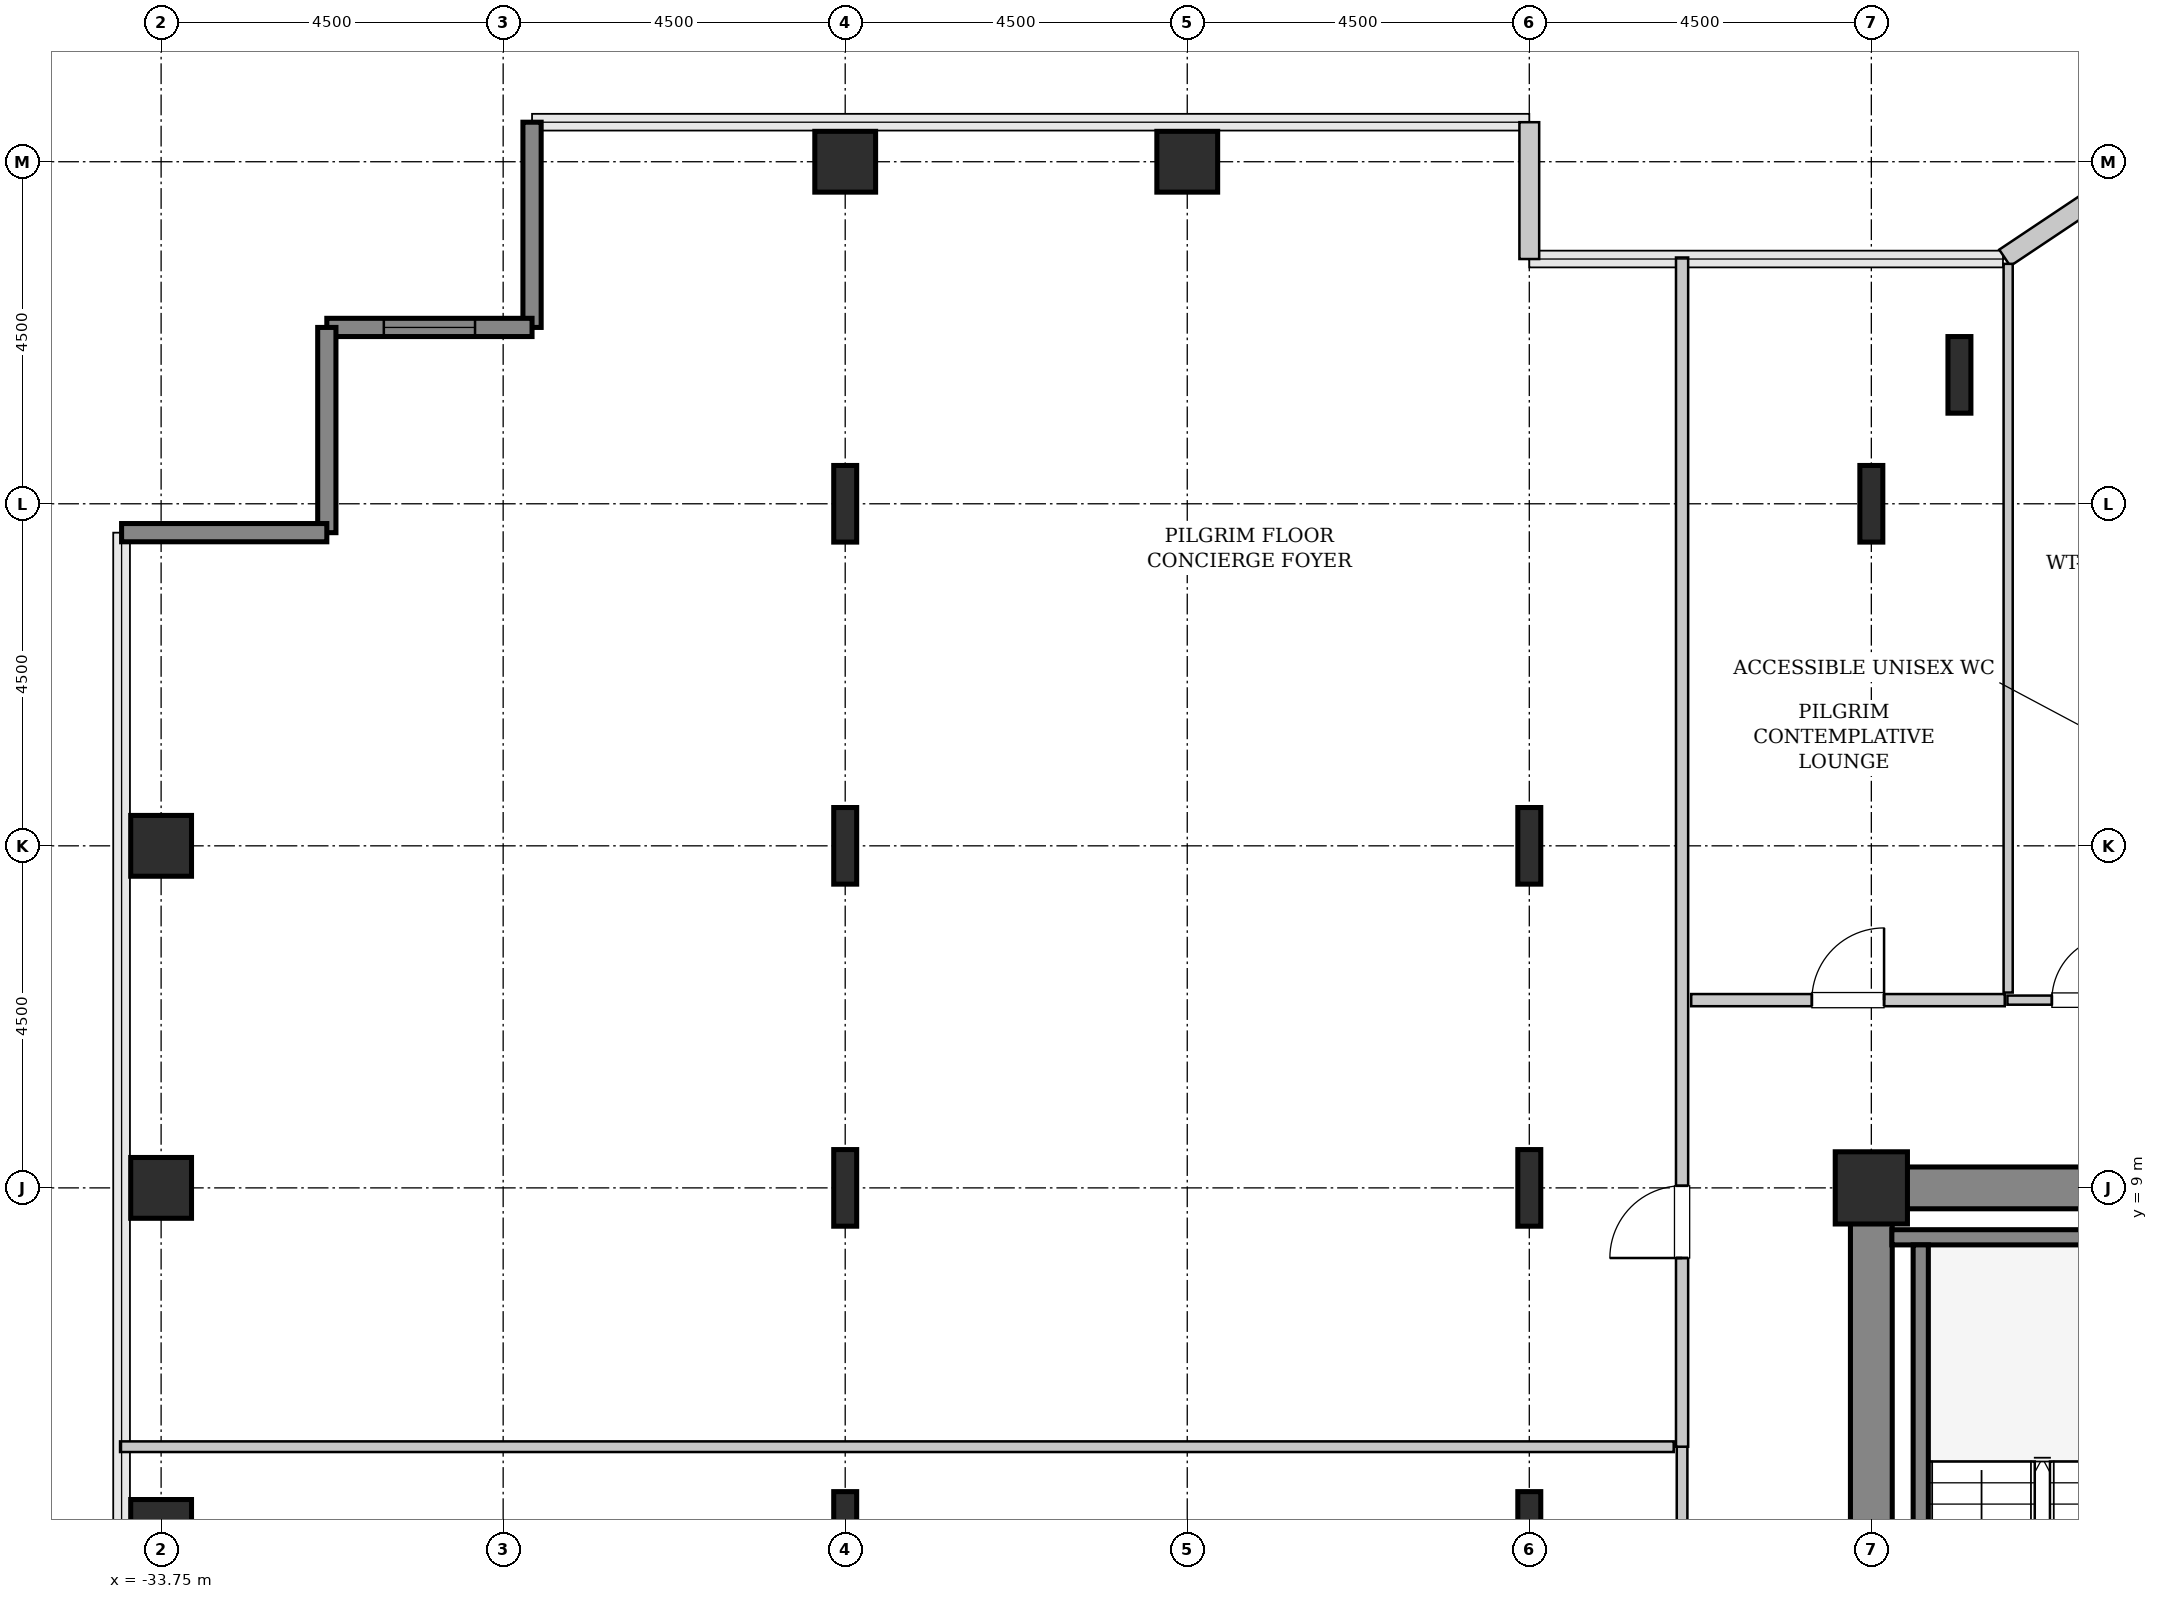
"""IFC4 building model, lengths in metres.
Left out: names, types, materials, properties, quantities, classifications, styles, units other than length and angle.
Written with IfcOpenShell. Run it as: python <this file> out.ifc"""

import sys

from ifc_helpers import new_model, si_unit, direction, frame, frame_2d, origin, origin_2d, place, context, subcontext, project, spatial, rectangle, hollow_rectangle, i_section, extrude, source, transform, mapped, element, fill, save


model = new_model("IFC4")
c1 = context("Model", 3, precision=1e-05, world=origin(), true_north=direction((0.0, 1.0)))
c2 = subcontext(c1, "Body", "Model", "MODEL_VIEW")
j1 = project(units=[si_unit("LENGTHUNIT", "METRE"), si_unit("PLANEANGLEUNIT", "RADIAN")], contexts=[c1])
p1 = place(None, origin())
s1 = spatial("IfcSite", under=j1, at=p1, CompositionType="ELEMENT")
p2 = place(p1, origin())
s2 = spatial("IfcBuilding", under=s1, at=p2, CompositionType="ELEMENT")
p3 = place(p2, frame((0.0, 0.0, 128.8)))
s3 = spatial("IfcBuildingStorey", under=s2, at=p3, CompositionType="ELEMENT", Elevation=128.8)
m1 = source(origin(), c2, "Body", "SweptSolid", [
    extrude(rectangle(XDim=9.975, YDim=0.55, at=frame_2d((4.987, 0.0))), origin(), (0.0, 0.0, 1.0), 3.8),
])
p4 = place(p3, frame((-11.525, 9.0, 0.0), z_axis=(0.0, 0.0, 1.0), x_axis=(1.0, 0.0, 0.0)))
e1 = element("IfcWall", 1, at=p4, inside=s3, PredefinedType="SHEAR", context=c2, shape_type="MappedRepresentation", body=[
    mapped(m1, transform((0.0, 0.0, 0.0), x_axis=(1.0, 0.0, 0.0), y_axis=(0.0, 1.0, 0.0), z_axis=(0.0, 0.0, 1.0), scale=1.0)),
])
m2 = source(origin(), c2, "Body", "SweptSolid", [
    extrude(rectangle(XDim=7.375, YDim=0.55, at=frame_2d((3.688, 0.0))), origin(), (0.0, 0.0, 1.0), 3.8),
])
p5 = place(p3, frame((-11.25, 1.35, 0.0), z_axis=(0.0, 0.0, 1.0), x_axis=(0.0, 1.0, 0.0)))
e2 = element("IfcWall", 2, at=p5, inside=s3, PredefinedType="SHEAR", context=c2, shape_type="MappedRepresentation", body=[
    mapped(m2, transform((0.0, 0.0, 0.0), x_axis=(1.0, 0.0, 0.0), y_axis=(0.0, 1.0, 0.0), z_axis=(0.0, 0.0, 1.0), scale=1.0)),
])
m3 = source(origin(), c2, "Body", "SweptSolid", [
    extrude(hollow_rectangle(XDim=0.8, YDim=0.8, WallThickness=0.04, InnerFilletRadius=0.04, OuterFilletRadius=0.08, at=origin_2d()), origin(), (0.0, 0.0, 1.0), 3.8),
])
for number, where, z_axis, x_axis in (
    (3, (-33.75, 4.5, 0.0), (0.0, 0.0, 1.0), (1.0, 0.0, 0.0)),
    (4, (-33.75, 9.0, 0.0), (0.0, 0.0, 1.0), (1.0, 0.0, 0.0)),
    (5, (-33.75, 13.5, 0.0), (0.0, 0.0, 1.0), (1.0, 0.0, 0.0)),
):
    element("IfcColumn", number, at=place(p3, frame(where, z_axis=z_axis, x_axis=x_axis)), inside=s3, PredefinedType="COLUMN", context=c2, shape_type="MappedRepresentation", body=[
        mapped(m3, transform((0.0, 0.0, 0.0), x_axis=(1.0, 0.0, 0.0), y_axis=(0.0, 1.0, 0.0), z_axis=(0.0, 0.0, 1.0), scale=1.0)),
    ])
m4 = source(origin(), c2, "Body", "SweptSolid", [
    extrude(i_section(OverallWidth=0.302, OverallDepth=1.008, WebThickness=0.021, FlangeThickness=0.04, FilletRadius=0.03, at=origin_2d()), origin(), (0.0, 0.0, 1.0), 3.8),
])
for number, where, z_axis, x_axis in (
    (6, (-24.75, 4.5, 0.0), (0.0, 0.0, 1.0), (1.0, 0.0, 0.0)),
    (7, (-24.75, 9.0, 0.0), (0.0, 0.0, 1.0), (1.0, 0.0, 0.0)),
    (8, (-24.75, 13.5, 0.0), (0.0, 0.0, 1.0), (1.0, 0.0, 0.0)),
    (9, (-24.75, 18.0, 0.0), (0.0, 0.0, 1.0), (1.0, 0.0, 0.0)),
):
    element("IfcColumn", number, at=place(p3, frame(where, z_axis=z_axis, x_axis=x_axis)), inside=s3, PredefinedType="COLUMN", context=c2, shape_type="MappedRepresentation", body=[
        mapped(m4, transform((0.0, 0.0, 0.0), x_axis=(1.0, 0.0, 0.0), y_axis=(0.0, 1.0, 0.0), z_axis=(0.0, 0.0, 1.0), scale=1.0)),
    ])
for number, where, z_axis, x_axis in (
    (10, (-24.75, 22.5, 0.0), (0.0, 0.0, 1.0), (1.0, 0.0, 0.0)),
    (11, (-20.25, 22.5, 0.0), (0.0, 0.0, 1.0), (1.0, 0.0, 0.0)),
):
    element("IfcColumn", number, at=place(p3, frame(where, z_axis=z_axis, x_axis=x_axis)), inside=s3, PredefinedType="COLUMN", context=c2, shape_type="MappedRepresentation", body=[
        mapped(m3, transform((0.0, 0.0, 0.0), x_axis=(1.0, 0.0, 0.0), y_axis=(0.0, 1.0, 0.0), z_axis=(0.0, 0.0, 1.0), scale=1.0)),
    ])
for number, where, z_axis, x_axis in (
    (12, (-15.75, 4.5, 0.0), (0.0, 0.0, 1.0), (1.0, 0.0, 0.0)),
    (13, (-15.75, 9.0, 0.0), (0.0, 0.0, 1.0), (1.0, 0.0, 0.0)),
    (14, (-15.75, 13.5, 0.0), (0.0, 0.0, 1.0), (1.0, 0.0, 0.0)),
):
    element("IfcColumn", number, at=place(p3, frame(where, z_axis=z_axis, x_axis=x_axis)), inside=s3, PredefinedType="COLUMN", context=c2, shape_type="MappedRepresentation", body=[
        mapped(m4, transform((0.0, 0.0, 0.0), x_axis=(1.0, 0.0, 0.0), y_axis=(0.0, 1.0, 0.0), z_axis=(0.0, 0.0, 1.0), scale=1.0)),
    ])
m5 = source(origin(), c2, "Body", "SweptSolid", [
    extrude(hollow_rectangle(XDim=0.95, YDim=0.95, WallThickness=0.045, InnerFilletRadius=0.045, OuterFilletRadius=0.09, at=origin_2d()), origin(), (0.0, 0.0, 1.0), 3.8),
])
p6 = place(p3, frame((-11.25, 9.0, 0.0), z_axis=(0.0, 0.0, 1.0), x_axis=(1.0, 0.0, 0.0)))
e15 = element("IfcColumn", 15, at=p6, inside=s3, PredefinedType="COLUMN", context=c2, shape_type="MappedRepresentation", body=[
    mapped(m5, transform((0.0, 0.0, 0.0), x_axis=(1.0, 0.0, 0.0), y_axis=(0.0, 1.0, 0.0), z_axis=(0.0, 0.0, 1.0), scale=1.0)),
])
for number, where, z_axis, x_axis in (
    (16, (-11.25, 18.0, 0.0), (0.0, 0.0, 1.0), (1.0, 0.0, 0.0)),
    (17, (-10.091, 19.696, 0.0), (0.0, 0.0, 1.0), (1.0, 0.0, 0.0)),
):
    element("IfcColumn", number, at=place(p3, frame(where, z_axis=z_axis, x_axis=x_axis)), inside=s3, PredefinedType="COLUMN", context=c2, shape_type="MappedRepresentation", body=[
        mapped(m4, transform((0.0, 0.0, 0.0), x_axis=(1.0, 0.0, 0.0), y_axis=(0.0, 1.0, 0.0), z_axis=(0.0, 0.0, 1.0), scale=1.0)),
    ])
m6 = source(origin(), c2, "Body", "SweptSolid", [
    extrude(rectangle(XDim=1.469, YDim=0.26, at=frame_2d((0.734, 0.0))), origin(), (0.0, 0.0, 1.0), 3.55),
])
p7 = place(p3, frame((-8.273, 22.052, 0.0), z_axis=(0.0, 0.0, 1.0), x_axis=(-0.831461760506, -0.555581983884, 0.0)))
e18 = element("IfcWall", 18, at=p7, inside=s3, PredefinedType="SOLIDWALL", context=c2, shape_type="MappedRepresentation", body=[
    mapped(m6, transform((0.0, 0.0, 0.0), x_axis=(1.0, 0.0, 0.0), y_axis=(0.0, 1.0, 0.0), z_axis=(0.0, 0.0, 1.0), scale=1.0)),
])
m7 = source(origin(), c2, "Body", "SweptSolid", [
    extrude(rectangle(XDim=1.8, YDim=0.26, at=frame_2d((0.9, 0.0))), origin(), (0.0, 0.0, 1.0), 3.55),
])
p8 = place(p3, frame((-15.75, 21.22, 0.0), z_axis=(0.0, 0.0, 1.0), x_axis=(0.0, 1.0, 0.0)))
e19 = element("IfcWall", 19, at=p8, inside=s3, PredefinedType="SOLIDWALL", context=c2, shape_type="MappedRepresentation", body=[
    mapped(m7, transform((0.0, 0.0, 0.0), x_axis=(1.0, 0.0, 0.0), y_axis=(0.0, 1.0, 0.0), z_axis=(0.0, 0.0, 1.0), scale=1.0)),
])
m8 = source(origin(), c2, "Body", "SweptSolid", [
    extrude(rectangle(XDim=2.7, YDim=0.24, at=frame_2d((1.35, 0.0))), origin(), (0.0, 0.0, 1.0), 3.55),
])
p9 = place(p3, frame((-28.87, 23.02, 0.0), z_axis=(0.0, 0.0, 1.0), x_axis=(0.0, -1.0, 0.0)))
e20 = element("IfcWall", 20, at=p9, inside=s3, PredefinedType="SHEAR", context=c2, shape_type="MappedRepresentation", body=[
    mapped(m8, transform((0.0, 0.0, 0.0), x_axis=(1.0, 0.0, 0.0), y_axis=(0.0, 1.0, 0.0), z_axis=(0.0, 0.0, 1.0), scale=1.0)),
])
p10 = place(p3, frame((-28.87, 20.32, 0.0), z_axis=(0.0, 0.0, 1.0), x_axis=(-1.0, 0.0, 0.0)))
e21 = element("IfcWall", 21, at=p10, inside=s3, PredefinedType="SHEAR", context=c2, shape_type="MappedRepresentation", body=[
    mapped(m8, transform((0.0, 0.0, 0.0), x_axis=(1.0, 0.0, 0.0), y_axis=(0.0, 1.0, 0.0), z_axis=(0.0, 0.0, 1.0), scale=1.0)),
])
p11 = place(p10, frame((0.75, 0.0, 0.85)))
e22 = element("IfcOpeningElement", 22, at=p11, cuts=e21, PredefinedType="OPENING", context=c2, shape_type="SweptSolid", body=[
    extrude(rectangle(XDim=1.2, YDim=1.8, at=frame_2d((0.6, 0.9))), frame((0.0, 0.13, 0.0), z_axis=(0.0, -1.0, 0.0), x_axis=(1.0, 0.0, 0.0)), (0.0, 0.0, 1.0), 0.26),
])
for number, where, z_axis, x_axis in (
    (23, (-31.57, 20.32, 0.0), (0.0, 0.0, 1.0), (0.0, -1.0, 0.0)),
    (24, (-31.57, 17.62, 0.0), (0.0, 0.0, 1.0), (-1.0, 0.0, 0.0)),
):
    element("IfcWall", number, at=place(p3, frame(where, z_axis=z_axis, x_axis=x_axis)), inside=s3, PredefinedType="SHEAR", context=c2, shape_type="MappedRepresentation", body=[
        mapped(m8, transform((0.0, 0.0, 0.0), x_axis=(1.0, 0.0, 0.0), y_axis=(0.0, 1.0, 0.0), z_axis=(0.0, 0.0, 1.0), scale=1.0)),
    ])
m9 = source(origin(), c2, "Body", "SweptSolid", [
    extrude(rectangle(XDim=3.68, YDim=0.2, at=frame_2d((1.84, 0.0))), origin(), (0.0, 0.0, 1.0), 3.8),
])
p12 = place(p3, frame((-7.3, 8.35, 0.0), z_axis=(0.0, 0.0, 1.0), x_axis=(-1.0, 0.0, 0.0)))
e25 = element("IfcWall", 25, at=p12, inside=s3, PredefinedType="SOLIDWALL", context=c2, shape_type="MappedRepresentation", body=[
    mapped(m9, transform((0.0, 0.0, 0.0), x_axis=(1.0, 0.0, 0.0), y_axis=(0.0, 1.0, 0.0), z_axis=(0.0, 0.0, 1.0), scale=1.0)),
])
m10 = source(origin(), c2, "Body", "SweptSolid", [
    extrude(rectangle(XDim=7.1, YDim=0.2, at=frame_2d((3.55, 0.0))), origin(), (0.0, 0.0, 1.0), 3.8),
])
p13 = place(p3, frame((-10.6, 1.15, 0.0), z_axis=(0.0, 0.0, 1.0), x_axis=(0.0, 1.0, 0.0)))
e26 = element("IfcWall", 26, at=p13, inside=s3, PredefinedType="SOLIDWALL", context=c2, shape_type="MappedRepresentation", body=[
    mapped(m10, transform((0.0, 0.0, 0.0), x_axis=(1.0, 0.0, 0.0), y_axis=(0.0, 1.0, 0.0), z_axis=(0.0, 0.0, 1.0), scale=1.0)),
])
m11 = source(origin(), c2, "Body", "SweptSolid", [
    extrude(rectangle(XDim=2.02, YDim=0.12, at=frame_2d((1.01, 0.0))), origin(), (0.0, 0.0, 1.0), 3.535),
])
p14 = place(p3, frame((-9.46, 11.47, 0.0), z_axis=(0.0, 0.0, 1.0), x_axis=(1.0, 0.0, 0.0)))
e27 = element("IfcWall", 27, at=p14, inside=s3, PredefinedType="PLUMBINGWALL", context=c2, shape_type="MappedRepresentation", body=[
    mapped(m11, transform((0.0, 0.0, 0.0), x_axis=(1.0, 0.0, 0.0), y_axis=(0.0, 1.0, 0.0), z_axis=(0.0, 0.0, 1.0), scale=1.0)),
])
p15 = place(p14, frame((0.585, 0.0, 0.0)))
e28 = element("IfcOpeningElement", 28, at=p15, cuts=e27, PredefinedType="OPENING", context=c2, shape_type="SweptSolid", body=[
    extrude(rectangle(XDim=0.85, YDim=2.1, at=frame_2d((0.425, 1.05))), frame((0.0, 0.07, 0.0), z_axis=(0.0, -1.0, 0.0), x_axis=(1.0, 0.0, 0.0)), (0.0, 0.0, 1.0), 0.14),
])
m12 = source(origin(), c2, "Body", "SweptSolid", [
    extrude(rectangle(XDim=9.587, YDim=0.12, at=frame_2d((4.793, 0.0))), origin(), (0.0, 0.0, 1.0), 3.535),
])
p16 = place(p3, frame((-9.45, 11.57, 0.0), z_axis=(0.0, 0.0, 1.0), x_axis=(0.0, 1.0, 0.0)))
e29 = element("IfcWall", 29, at=p16, inside=s3, PredefinedType="PLUMBINGWALL", context=c2, shape_type="MappedRepresentation", body=[
    mapped(m12, transform((0.0, 0.0, 0.0), x_axis=(1.0, 0.0, 0.0), y_axis=(0.0, 1.0, 0.0), z_axis=(0.0, 0.0, 1.0), scale=1.0)),
])
m13 = source(origin(), c2, "Body", "SweptSolid", [
    extrude(rectangle(XDim=2.375, YDim=0.14, at=frame_2d((1.188, 0.0))), origin(), (0.0, 0.0, 1.0), 3.535),
])
p17 = place(p3, frame((-13.74, 3.23, 0.0), z_axis=(0.0, 0.0, 1.0), x_axis=(0.0, 1.0, 0.0)))
e30 = element("IfcWall", 30, at=p17, inside=s3, PredefinedType="PARTITIONING", context=c2, shape_type="MappedRepresentation", body=[
    mapped(m13, transform((0.0, 0.0, 0.0), x_axis=(1.0, 0.0, 0.0), y_axis=(0.0, 1.0, 0.0), z_axis=(0.0, 0.0, 1.0), scale=1.0)),
])
m14 = source(origin(), c2, "Body", "SweptSolid", [
    extrude(rectangle(XDim=20.44, YDim=0.14, at=frame_2d((10.22, 0.0))), origin(), (0.0, 0.0, 1.0), 3.535),
])
p18 = place(p3, frame((-34.29, 5.595, 0.0), z_axis=(0.0, 0.0, 1.0), x_axis=(1.0, 0.0, 0.0)))
e31 = element("IfcWall", 31, at=p18, inside=s3, PredefinedType="PARTITIONING", context=c2, shape_type="MappedRepresentation", body=[
    mapped(m14, transform((0.0, 0.0, 0.0), x_axis=(1.0, 0.0, 0.0), y_axis=(0.0, 1.0, 0.0), z_axis=(0.0, 0.0, 1.0), scale=1.0)),
])
m15 = source(origin(), c2, "Body", "SweptSolid", [
    extrude(rectangle(XDim=15.645, YDim=0.16, at=frame_2d((7.823, 0.0))), origin(), (0.0, 0.0, 1.0), 3.535),
])
p19 = place(p3, frame((-13.74, 5.595, 0.0), z_axis=(0.0, 0.0, 1.0), x_axis=(0.0, 1.0, 0.0)))
e32 = element("IfcWall", 32, at=p19, inside=s3, PredefinedType="PARTITIONING", context=c2, shape_type="MappedRepresentation", body=[
    mapped(m15, transform((0.0, 0.0, 0.0), x_axis=(1.0, 0.0, 0.0), y_axis=(0.0, 1.0, 0.0), z_axis=(0.0, 0.0, 1.0), scale=1.0)),
])
p20 = place(p19, frame((2.482, 0.0, 0.0)))
e33 = element("IfcOpeningElement", 33, at=p20, cuts=e32, PredefinedType="OPENING", context=c2, shape_type="SweptSolid", body=[
    extrude(rectangle(XDim=0.95, YDim=2.1, at=frame_2d((0.475, 1.05))), frame((0.0, 0.09, 0.0), z_axis=(0.0, -1.0, 0.0), x_axis=(1.0, 0.0, 0.0)), (0.0, 0.0, 1.0), 0.18),
])
m16 = source(origin(), c2, "Body", "SweptSolid", [
    extrude(rectangle(XDim=4.125, YDim=0.16, at=frame_2d((2.062, 0.0))), origin(), (0.0, 0.0, 1.0), 3.535),
])
p21 = place(p3, frame((-13.62, 11.47, 0.0), z_axis=(0.0, 0.0, 1.0), x_axis=(1.0, 0.0, 0.0)))
e34 = element("IfcWall", 34, at=p21, inside=s3, PredefinedType="PARTITIONING", context=c2, shape_type="MappedRepresentation", body=[
    mapped(m16, transform((0.0, 0.0, 0.0), x_axis=(1.0, 0.0, 0.0), y_axis=(0.0, 1.0, 0.0), z_axis=(0.0, 0.0, 1.0), scale=1.0)),
])
p22 = place(p21, frame((1.587, 0.0, 0.0)))
e35 = element("IfcOpeningElement", 35, at=p22, cuts=e34, PredefinedType="OPENING", context=c2, shape_type="SweptSolid", body=[
    extrude(rectangle(XDim=0.95, YDim=2.1, at=frame_2d((0.475, 1.05))), frame((0.0, 0.09, 0.0), z_axis=(0.0, -1.0, 0.0), x_axis=(1.0, 0.0, 0.0)), (0.0, 0.0, 1.0), 0.18),
])
m17 = source(origin(), c2, "Body", "SweptSolid", [
    extrude(rectangle(XDim=1.2, YDim=1.8, at=frame_2d((0.6, 0.9))), frame((0.0, 0.03, 0.0), z_axis=(0.0, -1.0, 0.0), x_axis=(1.0, 0.0, 0.0)), (0.0, 0.0, 1.0), 0.06),
])
p23 = place(p11, origin())
e36 = element("IfcWindow", 36, at=p23, inside=s3, PartitioningType="SINGLE_PANEL", PredefinedType="WINDOW", context=c2, shape_type="MappedRepresentation", body=[
    mapped(m17, transform((0.0, 0.0, 0.0), x_axis=(1.0, 0.0, 0.0), y_axis=(0.0, 1.0, 0.0), z_axis=(0.0, 0.0, 1.0), scale=1.0)),
])
fill(e22, e36)
m18 = source(origin(), c2, "Body", "SweptSolid", [
    extrude(rectangle(XDim=0.85, YDim=2.1, at=frame_2d((0.425, 1.05))), frame((0.0, 0.025, 0.0), z_axis=(0.0, -1.0, 0.0), x_axis=(1.0, 0.0, 0.0)), (0.0, 0.0, 1.0), 0.05),
])
p24 = place(p15, origin())
e37 = element("IfcDoor", 37, at=p24, inside=s3, OperationType="SINGLE_SWING_RIGHT", PredefinedType="DOOR", context=c2, shape_type="MappedRepresentation", body=[
    mapped(m18, transform((0.0, 0.0, 0.0), x_axis=(1.0, 0.0, 0.0), y_axis=(0.0, 1.0, 0.0), z_axis=(0.0, 0.0, 1.0), scale=1.0)),
])
fill(e28, e37)
m19 = source(origin(), c2, "Body", "SweptSolid", [
    extrude(rectangle(XDim=0.95, YDim=2.1, at=frame_2d((0.475, 1.05))), frame((0.0, 0.025, 0.0), z_axis=(0.0, -1.0, 0.0), x_axis=(1.0, 0.0, 0.0)), (0.0, 0.0, 1.0), 0.05),
])
p25 = place(p20, origin())
e38 = element("IfcDoor", 38, at=p25, inside=s3, OperationType="SINGLE_SWING_LEFT", PredefinedType="DOOR", context=c2, shape_type="MappedRepresentation", body=[
    mapped(m19, transform((0.0, 0.0, 0.0), x_axis=(1.0, 0.0, 0.0), y_axis=(0.0, 1.0, 0.0), z_axis=(0.0, 0.0, 1.0), scale=1.0)),
])
fill(e33, e38)
p26 = place(p22, origin())
e39 = element("IfcDoor", 39, at=p26, inside=s3, OperationType="SINGLE_SWING_RIGHT", PredefinedType="DOOR", context=c2, shape_type="MappedRepresentation", body=[
    mapped(m19, transform((0.0, 0.0, 0.0), x_axis=(1.0, 0.0, 0.0), y_axis=(0.0, 1.0, 0.0), z_axis=(0.0, 0.0, 1.0), scale=1.0)),
])
fill(e35, e39)
save(model, sys.argv[1])
